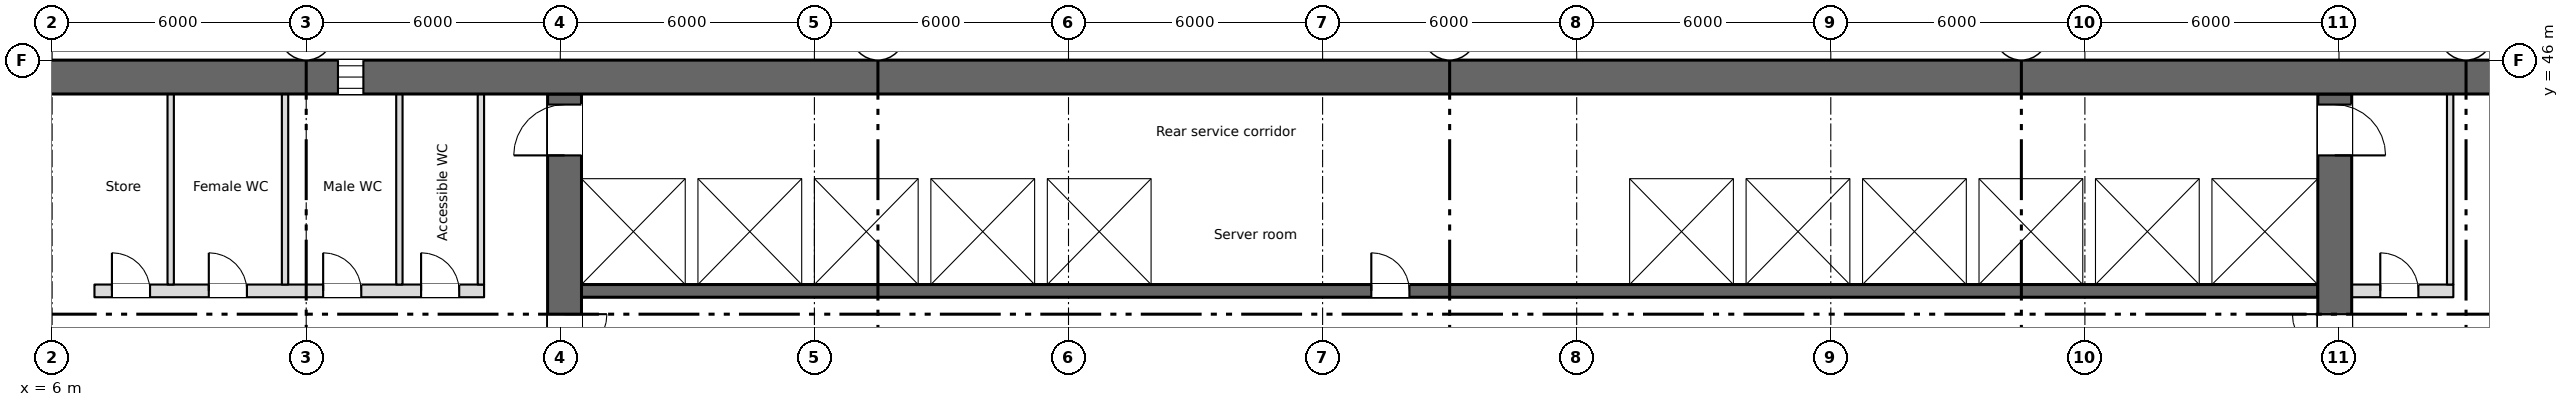
"""IFC4 building model, lengths in metres.
Left out: names, types, materials, properties, quantities, classifications, styles, units other than length and angle.
Written with IfcOpenShell. Run it as: python <this file> out.ifc"""

import sys

from ifc_helpers import new_model, si_unit, direction, frame, frame_2d, origin, place, context, subcontext, project, spatial, rectangle, extrude, element, fill, save


model = new_model("IFC4")
c1 = context("Model", 3, precision=1e-05, world=origin(), true_north=direction((0.0, 1.0)))
c2 = subcontext(c1, "Body", "Model", "MODEL_VIEW")
j1 = project(units=[si_unit("LENGTHUNIT", "METRE"), si_unit("PLANEANGLEUNIT", "RADIAN")], contexts=[c1])
p1 = place(None, origin())
s1 = spatial("IfcSite", under=j1, at=p1, CompositionType="ELEMENT")
p2 = place(p1, origin())
s2 = spatial("IfcBuilding", under=s1, at=p2, CompositionType="ELEMENT")
p3 = place(p2, frame((0.0, 0.0, 125.0)))
s3 = spatial("IfcBuildingStorey", under=s2, at=p3, CompositionType="ELEMENT", Elevation=125.0)
p4 = place(p3, frame((5.55, 45.6, 0.0), z_axis=(0.0, 0.0, 1.0), x_axis=(1.0, 0.0, 0.0)))
e1 = element("IfcWall", 1, at=p4, inside=s3, PredefinedType="SHEAR", context=c2, shape_type="SweptSolid", body=[
    extrude(rectangle(XDim=60.9, YDim=0.8, at=frame_2d((30.45, 0.0))), origin(), (0.0, 0.0, 1.0), 3.35),
])
p5 = place(p4, frame((7.2, 0.0, 0.6)))
e2 = element("IfcOpeningElement", 2, at=p5, cuts=e1, PredefinedType="OPENING", context=c2, shape_type="SweptSolid", body=[
    extrude(rectangle(XDim=0.6, YDim=2.4, at=frame_2d((0.3, 1.2))), frame((0.0, 0.41, 0.0), z_axis=(0.0, -1.0, 0.0), x_axis=(1.0, 0.0, 0.0)), (0.0, 0.0, 1.0), 0.82),
])
p6 = place(p3, frame((6.85, 28.4, 0.0), z_axis=(0.0, 0.0, 1.0), x_axis=(0.0, 1.0, 0.0)))
e3 = element("IfcWall", 3, at=p6, inside=s3, PredefinedType="SHEAR", context=c2, shape_type="SweptSolid", body=[
    extrude(rectangle(XDim=16.8, YDim=0.3, at=frame_2d((8.4, 0.0))), origin(), (0.0, 0.0, 1.0), 3.35),
])
p7 = place(p3, frame((18.1, 28.4, 0.0), z_axis=(0.0, 0.0, 1.0), x_axis=(0.0, 1.0, 0.0)))
e4 = element("IfcWall", 4, at=p7, inside=s3, PredefinedType="SHEAR", context=c2, shape_type="SweptSolid", body=[
    extrude(rectangle(XDim=16.8, YDim=0.8, at=frame_2d((8.4, 0.0))), origin(), (0.0, 0.0, 1.0), 3.35),
])
p8 = place(p7, frame((9.6, 0.0, 0.0)))
e5 = element("IfcOpeningElement", 5, at=p8, cuts=e4, PredefinedType="OPENING", context=c2, shape_type="SweptSolid", body=[
    extrude(rectangle(XDim=2.0, YDim=2.1, at=frame_2d((1.0, 1.05))), frame((0.0, 0.41, 0.0), z_axis=(0.0, -1.0, 0.0), x_axis=(1.0, 0.0, 0.0)), (0.0, 0.0, 1.0), 0.82),
])
p9 = place(p7, frame((15.35, 0.0, 0.0)))
e6 = element("IfcOpeningElement", 6, at=p9, cuts=e4, PredefinedType="OPENING", context=c2, shape_type="SweptSolid", body=[
    extrude(rectangle(XDim=1.2, YDim=2.1, at=frame_2d((0.6, 1.05))), frame((0.0, 0.41, 0.0), z_axis=(0.0, -1.0, 0.0), x_axis=(1.0, 0.0, 0.0)), (0.0, 0.0, 1.0), 0.82),
])
p10 = place(p3, frame((59.9, 28.4, 0.0), z_axis=(0.0, 0.0, 1.0), x_axis=(0.0, 1.0, 0.0)))
e7 = element("IfcWall", 7, at=p10, inside=s3, PredefinedType="SHEAR", context=c2, shape_type="SweptSolid", body=[
    extrude(rectangle(XDim=16.8, YDim=0.8, at=frame_2d((8.4, 0.0))), origin(), (0.0, 0.0, 1.0), 3.35),
])
p11 = place(p10, frame((9.6, 0.0, 0.0)))
e8 = element("IfcOpeningElement", 8, at=p11, cuts=e7, PredefinedType="OPENING", context=c2, shape_type="SweptSolid", body=[
    extrude(rectangle(XDim=2.0, YDim=2.1, at=frame_2d((1.0, 1.05))), frame((0.0, 0.41, 0.0), z_axis=(0.0, -1.0, 0.0), x_axis=(1.0, 0.0, 0.0)), (0.0, 0.0, 1.0), 0.82),
])
p12 = place(p10, frame((15.35, 0.0, 0.0)))
e9 = element("IfcOpeningElement", 9, at=p12, cuts=e7, PredefinedType="OPENING", context=c2, shape_type="SweptSolid", body=[
    extrude(rectangle(XDim=1.2, YDim=2.1, at=frame_2d((0.6, 1.05))), frame((0.0, 0.41, 0.0), z_axis=(0.0, -1.0, 0.0), x_axis=(1.0, 0.0, 0.0)), (0.0, 0.0, 1.0), 0.82),
])
p13 = place(p3, frame((18.5, 40.55, 0.0), z_axis=(0.0, 0.0, 1.0), x_axis=(1.0, 0.0, 0.0)))
e10 = element("IfcWall", 10, at=p13, inside=s3, PredefinedType="SHEAR", context=c2, shape_type="SweptSolid", body=[
    extrude(rectangle(XDim=41.0, YDim=0.3, at=frame_2d((20.5, 0.0))), origin(), (0.0, 0.0, 1.0), 3.35),
])
p14 = place(p13, frame((18.65, 0.0, 0.0)))
e11 = element("IfcOpeningElement", 11, at=p14, cuts=e10, PredefinedType="OPENING", context=c2, shape_type="SweptSolid", body=[
    extrude(rectangle(XDim=0.9, YDim=2.1, at=frame_2d((0.45, 1.05))), frame((0.0, 0.16, 0.0), z_axis=(0.0, -1.0, 0.0), x_axis=(1.0, 0.0, 0.0)), (0.0, 0.0, 1.0), 0.32),
])
p15 = place(p13, frame((6.175, 0.0, 0.0)))
e12 = element("IfcOpeningElement", 12, at=p15, cuts=e10, PredefinedType="OPENING", context=c2, shape_type="SweptSolid", body=[
    extrude(rectangle(XDim=1.1, YDim=2.1, at=frame_2d((0.55, 1.05))), frame((0.0, 0.16, 0.0), z_axis=(0.0, -1.0, 0.0), x_axis=(1.0, 0.0, 0.0)), (0.0, 0.0, 1.0), 0.32),
])
p16 = place(p13, frame((8.925, 0.0, 0.0)))
e13 = element("IfcOpeningElement", 13, at=p16, cuts=e10, PredefinedType="OPENING", context=c2, shape_type="SweptSolid", body=[
    extrude(rectangle(XDim=1.1, YDim=2.1, at=frame_2d((0.55, 1.05))), frame((0.0, 0.16, 0.0), z_axis=(0.0, -1.0, 0.0), x_axis=(1.0, 0.0, 0.0)), (0.0, 0.0, 1.0), 0.32),
])
p17 = place(p13, frame((11.675, 0.0, 0.0)))
e14 = element("IfcOpeningElement", 14, at=p17, cuts=e10, PredefinedType="OPENING", context=c2, shape_type="SweptSolid", body=[
    extrude(rectangle(XDim=1.1, YDim=2.1, at=frame_2d((0.55, 1.05))), frame((0.0, 0.16, 0.0), z_axis=(0.0, -1.0, 0.0), x_axis=(1.0, 0.0, 0.0)), (0.0, 0.0, 1.0), 0.32),
])
p18 = place(p13, frame((30.925, 0.0, 0.0)))
e15 = element("IfcOpeningElement", 15, at=p18, cuts=e10, PredefinedType="OPENING", context=c2, shape_type="SweptSolid", body=[
    extrude(rectangle(XDim=1.1, YDim=2.1, at=frame_2d((0.55, 1.05))), frame((0.0, 0.16, 0.0), z_axis=(0.0, -1.0, 0.0), x_axis=(1.0, 0.0, 0.0)), (0.0, 0.0, 1.0), 0.32),
])
p19 = place(p13, frame((33.675, 0.0, 0.0)))
e16 = element("IfcOpeningElement", 16, at=p19, cuts=e10, PredefinedType="OPENING", context=c2, shape_type="SweptSolid", body=[
    extrude(rectangle(XDim=1.1, YDim=2.1, at=frame_2d((0.55, 1.05))), frame((0.0, 0.16, 0.0), z_axis=(0.0, -1.0, 0.0), x_axis=(1.0, 0.0, 0.0)), (0.0, 0.0, 1.0), 0.32),
])
p20 = place(p13, frame((36.375, 0.0, 0.0)))
e17 = element("IfcOpeningElement", 17, at=p20, cuts=e10, PredefinedType="OPENING", context=c2, shape_type="SweptSolid", body=[
    extrude(rectangle(XDim=1.2, YDim=2.1, at=frame_2d((0.6, 1.05))), frame((0.0, 0.16, 0.0), z_axis=(0.0, -1.0, 0.0), x_axis=(1.0, 0.0, 0.0)), (0.0, 0.0, 1.0), 0.32),
])
p21 = place(p13, frame((39.15, 0.0, 0.0)))
e18 = element("IfcOpeningElement", 18, at=p21, cuts=e10, PredefinedType="OPENING", context=c2, shape_type="SweptSolid", body=[
    extrude(rectangle(XDim=1.2, YDim=2.1, at=frame_2d((0.6, 1.05))), frame((0.0, 0.16, 0.0), z_axis=(0.0, -1.0, 0.0), x_axis=(1.0, 0.0, 0.0)), (0.0, 0.0, 1.0), 0.32),
])
p22 = place(p3, frame((18.5, 43.35, 0.0), z_axis=(0.0, 0.0, 1.0), x_axis=(1.0, 0.0, 0.0)))
e19 = element("IfcWall", 19, at=p22, inside=s3, PredefinedType="SHEAR", context=c2, shape_type="SweptSolid", body=[
    extrude(rectangle(XDim=41.0, YDim=0.3, at=frame_2d((20.5, 0.0))), origin(), (0.0, 0.0, 1.0), 3.35),
])
p23 = place(p3, frame((7.0, 40.55, 0.0), z_axis=(0.0, 0.0, 1.0), x_axis=(1.0, 0.0, 0.0)))
e20 = element("IfcWall", 20, at=p23, inside=s3, PredefinedType="PARTITIONING", context=c2, shape_type="SweptSolid", body=[
    extrude(rectangle(XDim=9.2, YDim=0.3, at=frame_2d((4.6, 0.0))), origin(), (0.0, 0.0, 1.0), 3.35),
])
p24 = place(p23, frame((0.413, 0.0, 0.0)))
e21 = element("IfcOpeningElement", 21, at=p24, cuts=e20, PredefinedType="OPENING", context=c2, shape_type="SweptSolid", body=[
    extrude(rectangle(XDim=0.9, YDim=2.1, at=frame_2d((0.45, 1.05))), frame((0.0, 0.16, 0.0), z_axis=(0.0, -1.0, 0.0), x_axis=(1.0, 0.0, 0.0)), (0.0, 0.0, 1.0), 0.32),
])
p25 = place(p23, frame((2.7, 0.0, 0.0)))
e22 = element("IfcOpeningElement", 22, at=p25, cuts=e20, PredefinedType="OPENING", context=c2, shape_type="SweptSolid", body=[
    extrude(rectangle(XDim=0.9, YDim=2.1, at=frame_2d((0.45, 1.05))), frame((0.0, 0.16, 0.0), z_axis=(0.0, -1.0, 0.0), x_axis=(1.0, 0.0, 0.0)), (0.0, 0.0, 1.0), 0.32),
])
p26 = place(p23, frame((5.4, 0.0, 0.0)))
e23 = element("IfcOpeningElement", 23, at=p26, cuts=e20, PredefinedType="OPENING", context=c2, shape_type="SweptSolid", body=[
    extrude(rectangle(XDim=0.9, YDim=2.1, at=frame_2d((0.45, 1.05))), frame((0.0, 0.16, 0.0), z_axis=(0.0, -1.0, 0.0), x_axis=(1.0, 0.0, 0.0)), (0.0, 0.0, 1.0), 0.32),
])
p27 = place(p23, frame((7.712, 0.0, 0.0)))
e24 = element("IfcOpeningElement", 24, at=p27, cuts=e20, PredefinedType="OPENING", context=c2, shape_type="SweptSolid", body=[
    extrude(rectangle(XDim=0.9, YDim=2.1, at=frame_2d((0.45, 1.05))), frame((0.0, 0.16, 0.0), z_axis=(0.0, -1.0, 0.0), x_axis=(1.0, 0.0, 0.0)), (0.0, 0.0, 1.0), 0.32),
])
p28 = place(p3, frame((60.3, 40.55, 0.0), z_axis=(0.0, 0.0, 1.0), x_axis=(1.0, 0.0, 0.0)))
e25 = element("IfcWall", 25, at=p28, inside=s3, PredefinedType="PARTITIONING", context=c2, shape_type="SweptSolid", body=[
    extrude(rectangle(XDim=2.4, YDim=0.3, at=frame_2d((1.2, 0.0))), origin(), (0.0, 0.0, 1.0), 3.35),
])
p29 = place(p28, frame((0.675, 0.0, 0.0)))
e26 = element("IfcOpeningElement", 26, at=p29, cuts=e25, PredefinedType="OPENING", context=c2, shape_type="SweptSolid", body=[
    extrude(rectangle(XDim=0.9, YDim=2.1, at=frame_2d((0.45, 1.05))), frame((0.0, 0.16, 0.0), z_axis=(0.0, -1.0, 0.0), x_axis=(1.0, 0.0, 0.0)), (0.0, 0.0, 1.0), 0.32),
])
for number, where, z_axis, x_axis in (
    (27, (21.1, 40.7, 0.0), (0.0, 0.0, 1.0), (0.0, 1.0, 0.0)),
    (28, (23.85, 40.7, 0.0), (0.0, 0.0, 1.0), (0.0, 1.0, 0.0)),
    (29, (26.6, 40.7, 0.0), (0.0, 0.0, 1.0), (0.0, 1.0, 0.0)),
    (30, (29.35, 40.7, 0.0), (0.0, 0.0, 1.0), (0.0, 1.0, 0.0)),
    (31, (32.1, 40.7, 0.0), (0.0, 0.0, 1.0), (0.0, 1.0, 0.0)),
    (32, (43.1, 40.7, 0.0), (0.0, 0.0, 1.0), (0.0, 1.0, 0.0)),
    (33, (45.85, 40.7, 0.0), (0.0, 0.0, 1.0), (0.0, 1.0, 0.0)),
    (34, (48.6, 40.7, 0.0), (0.0, 0.0, 1.0), (0.0, 1.0, 0.0)),
    (35, (51.35, 40.7, 0.0), (0.0, 0.0, 1.0), (0.0, 1.0, 0.0)),
    (36, (54.1, 40.7, 0.0), (0.0, 0.0, 1.0), (0.0, 1.0, 0.0)),
    (37, (56.85, 40.7, 0.0), (0.0, 0.0, 1.0), (0.0, 1.0, 0.0)),
):
    element("IfcWall", number, at=place(p3, frame(where, z_axis=z_axis, x_axis=x_axis)), inside=s3, PredefinedType="SHEAR", context=c2, shape_type="SweptSolid", body=[
        extrude(rectangle(XDim=2.5, YDim=0.3, at=frame_2d((1.25, 0.0))), origin(), (0.0, 0.0, 1.0), 3.35),
    ])
for number, where, z_axis, x_axis in (
    (38, (16.125, 40.7, 0.0), (0.0, 0.0, 1.0), (0.0, 1.0, 0.0)),
    (39, (62.625, 40.7, 0.0), (0.0, 0.0, 1.0), (0.0, 1.0, 0.0)),
    (40, (8.8, 40.7, 0.0), (0.0, 0.0, 1.0), (0.0, 1.0, 0.0)),
    (41, (11.5, 40.7, 0.0), (0.0, 0.0, 1.0), (0.0, 1.0, 0.0)),
    (42, (14.2, 40.7, 0.0), (0.0, 0.0, 1.0), (0.0, 1.0, 0.0)),
):
    element("IfcWall", number, at=place(p3, frame(where, z_axis=z_axis, x_axis=x_axis)), inside=s3, PredefinedType="PARTITIONING", context=c2, shape_type="SweptSolid", body=[
        extrude(rectangle(XDim=4.5, YDim=0.15, at=frame_2d((2.25, 0.0))), origin(), (0.0, 0.0, 1.0), 3.35),
    ])
p30 = place(p5, origin())
e43 = element("IfcWindow", 43, at=p30, inside=s3, PartitioningType="SINGLE_PANEL", PredefinedType="WINDOW", context=c2, shape_type="SweptSolid", body=[
    extrude(rectangle(XDim=0.6, YDim=2.4, at=frame_2d((0.3, 1.2))), frame((0.0, 0.03, 0.0), z_axis=(0.0, -1.0, 0.0), x_axis=(1.0, 0.0, 0.0)), (0.0, 0.0, 1.0), 0.06),
])
fill(e2, e43)
p31 = place(p24, origin())
e44 = element("IfcDoor", 44, at=p31, inside=s3, OperationType="SINGLE_SWING_LEFT", PredefinedType="DOOR", context=c2, shape_type="SweptSolid", body=[
    extrude(rectangle(XDim=0.9, YDim=2.1, at=frame_2d((0.45, 1.05))), frame((0.0, 0.025, 0.0), z_axis=(0.0, -1.0, 0.0), x_axis=(1.0, 0.0, 0.0)), (0.0, 0.0, 1.0), 0.05),
])
fill(e21, e44)
p32 = place(p25, origin())
e45 = element("IfcDoor", 45, at=p32, inside=s3, OperationType="SINGLE_SWING_LEFT", PredefinedType="DOOR", context=c2, shape_type="SweptSolid", body=[
    extrude(rectangle(XDim=0.9, YDim=2.1, at=frame_2d((0.45, 1.05))), frame((0.0, 0.025, 0.0), z_axis=(0.0, -1.0, 0.0), x_axis=(1.0, 0.0, 0.0)), (0.0, 0.0, 1.0), 0.05),
])
fill(e22, e45)
p33 = place(p26, origin())
e46 = element("IfcDoor", 46, at=p33, inside=s3, OperationType="SINGLE_SWING_LEFT", PredefinedType="DOOR", context=c2, shape_type="SweptSolid", body=[
    extrude(rectangle(XDim=0.9, YDim=2.1, at=frame_2d((0.45, 1.05))), frame((0.0, 0.025, 0.0), z_axis=(0.0, -1.0, 0.0), x_axis=(1.0, 0.0, 0.0)), (0.0, 0.0, 1.0), 0.05),
])
fill(e23, e46)
p34 = place(p27, origin())
e47 = element("IfcDoor", 47, at=p34, inside=s3, OperationType="SINGLE_SWING_LEFT", PredefinedType="DOOR", context=c2, shape_type="SweptSolid", body=[
    extrude(rectangle(XDim=0.9, YDim=2.1, at=frame_2d((0.45, 1.05))), frame((0.0, 0.025, 0.0), z_axis=(0.0, -1.0, 0.0), x_axis=(1.0, 0.0, 0.0)), (0.0, 0.0, 1.0), 0.05),
])
fill(e24, e47)
p35 = place(p29, origin())
e48 = element("IfcDoor", 48, at=p35, inside=s3, OperationType="SINGLE_SWING_LEFT", PredefinedType="DOOR", context=c2, shape_type="SweptSolid", body=[
    extrude(rectangle(XDim=0.9, YDim=2.1, at=frame_2d((0.45, 1.05))), frame((0.0, 0.025, 0.0), z_axis=(0.0, -1.0, 0.0), x_axis=(1.0, 0.0, 0.0)), (0.0, 0.0, 1.0), 0.05),
])
fill(e26, e48)
p36 = place(p14, origin())
e49 = element("IfcDoor", 49, at=p36, inside=s3, OperationType="SINGLE_SWING_LEFT", PredefinedType="DOOR", context=c2, shape_type="SweptSolid", body=[
    extrude(rectangle(XDim=0.9, YDim=2.1, at=frame_2d((0.45, 1.05))), frame((0.0, 0.025, 0.0), z_axis=(0.0, -1.0, 0.0), x_axis=(1.0, 0.0, 0.0)), (0.0, 0.0, 1.0), 0.05),
])
fill(e11, e49)
p37 = place(p15, origin())
e50 = element("IfcDoor", 50, at=p37, inside=s3, OperationType="SLIDING_TO_LEFT", PredefinedType="DOOR", context=c2, shape_type="SweptSolid", body=[
    extrude(rectangle(XDim=1.1, YDim=2.1, at=frame_2d((0.55, 1.05))), frame((0.0, 0.025, 0.0), z_axis=(0.0, -1.0, 0.0), x_axis=(1.0, 0.0, 0.0)), (0.0, 0.0, 1.0), 0.05),
])
fill(e12, e50)
p38 = place(p16, origin())
e51 = element("IfcDoor", 51, at=p38, inside=s3, OperationType="SLIDING_TO_LEFT", PredefinedType="DOOR", context=c2, shape_type="SweptSolid", body=[
    extrude(rectangle(XDim=1.1, YDim=2.1, at=frame_2d((0.55, 1.05))), frame((0.0, 0.025, 0.0), z_axis=(0.0, -1.0, 0.0), x_axis=(1.0, 0.0, 0.0)), (0.0, 0.0, 1.0), 0.05),
])
fill(e13, e51)
p39 = place(p17, origin())
e52 = element("IfcDoor", 52, at=p39, inside=s3, OperationType="SLIDING_TO_LEFT", PredefinedType="DOOR", context=c2, shape_type="SweptSolid", body=[
    extrude(rectangle(XDim=1.1, YDim=2.1, at=frame_2d((0.55, 1.05))), frame((0.0, 0.025, 0.0), z_axis=(0.0, -1.0, 0.0), x_axis=(1.0, 0.0, 0.0)), (0.0, 0.0, 1.0), 0.05),
])
fill(e14, e52)
p40 = place(p18, origin())
e53 = element("IfcDoor", 53, at=p40, inside=s3, OperationType="SLIDING_TO_LEFT", PredefinedType="DOOR", context=c2, shape_type="SweptSolid", body=[
    extrude(rectangle(XDim=1.1, YDim=2.1, at=frame_2d((0.55, 1.05))), frame((0.0, 0.025, 0.0), z_axis=(0.0, -1.0, 0.0), x_axis=(1.0, 0.0, 0.0)), (0.0, 0.0, 1.0), 0.05),
])
fill(e15, e53)
p41 = place(p19, origin())
e54 = element("IfcDoor", 54, at=p41, inside=s3, OperationType="SLIDING_TO_LEFT", PredefinedType="DOOR", context=c2, shape_type="SweptSolid", body=[
    extrude(rectangle(XDim=1.1, YDim=2.1, at=frame_2d((0.55, 1.05))), frame((0.0, 0.025, 0.0), z_axis=(0.0, -1.0, 0.0), x_axis=(1.0, 0.0, 0.0)), (0.0, 0.0, 1.0), 0.05),
])
fill(e16, e54)
p42 = place(p20, origin())
e55 = element("IfcDoor", 55, at=p42, inside=s3, OperationType="SLIDING_TO_LEFT", PredefinedType="DOOR", context=c2, shape_type="SweptSolid", body=[
    extrude(rectangle(XDim=1.2, YDim=2.1, at=frame_2d((0.6, 1.05))), frame((0.0, 0.025, 0.0), z_axis=(0.0, -1.0, 0.0), x_axis=(1.0, 0.0, 0.0)), (0.0, 0.0, 1.0), 0.05),
])
fill(e17, e55)
p43 = place(p21, origin())
e56 = element("IfcDoor", 56, at=p43, inside=s3, OperationType="SLIDING_TO_LEFT", PredefinedType="DOOR", context=c2, shape_type="SweptSolid", body=[
    extrude(rectangle(XDim=1.2, YDim=2.1, at=frame_2d((0.6, 1.05))), frame((0.0, 0.025, 0.0), z_axis=(0.0, -1.0, 0.0), x_axis=(1.0, 0.0, 0.0)), (0.0, 0.0, 1.0), 0.05),
])
fill(e18, e56)
p44 = place(p8, origin())
e57 = element("IfcDoor", 57, at=p44, inside=s3, OperationType="DOUBLE_DOOR_SINGLE_SWING", PredefinedType="DOOR", context=c2, shape_type="SweptSolid", body=[
    extrude(rectangle(XDim=2.0, YDim=2.1, at=frame_2d((1.0, 1.05))), frame((0.0, 0.025, 0.0), z_axis=(0.0, -1.0, 0.0), x_axis=(1.0, 0.0, 0.0)), (0.0, 0.0, 1.0), 0.05),
])
fill(e5, e57)
p45 = place(p11, origin())
e58 = element("IfcDoor", 58, at=p45, inside=s3, OperationType="DOUBLE_DOOR_SINGLE_SWING", PredefinedType="DOOR", context=c2, shape_type="SweptSolid", body=[
    extrude(rectangle(XDim=2.0, YDim=2.1, at=frame_2d((1.0, 1.05))), frame((0.0, 0.025, 0.0), z_axis=(0.0, -1.0, 0.0), x_axis=(1.0, 0.0, 0.0)), (0.0, 0.0, 1.0), 0.05),
])
fill(e8, e58)
p46 = place(p9, origin())
e59 = element("IfcDoor", 59, at=p46, inside=s3, OperationType="SINGLE_SWING_LEFT", PredefinedType="DOOR", context=c2, shape_type="SweptSolid", body=[
    extrude(rectangle(XDim=1.2, YDim=2.1, at=frame_2d((0.6, 1.05))), frame((0.0, 0.025, 0.0), z_axis=(0.0, -1.0, 0.0), x_axis=(1.0, 0.0, 0.0)), (0.0, 0.0, 1.0), 0.05),
])
fill(e6, e59)
p47 = place(p12, origin())
e60 = element("IfcDoor", 60, at=p47, inside=s3, OperationType="SINGLE_SWING_LEFT", PredefinedType="DOOR", context=c2, shape_type="SweptSolid", body=[
    extrude(rectangle(XDim=1.2, YDim=2.1, at=frame_2d((0.6, 1.05))), frame((0.0, 0.025, 0.0), z_axis=(0.0, -1.0, 0.0), x_axis=(1.0, 0.0, 0.0)), (0.0, 0.0, 1.0), 0.05),
])
fill(e9, e60)
save(model, sys.argv[1])
